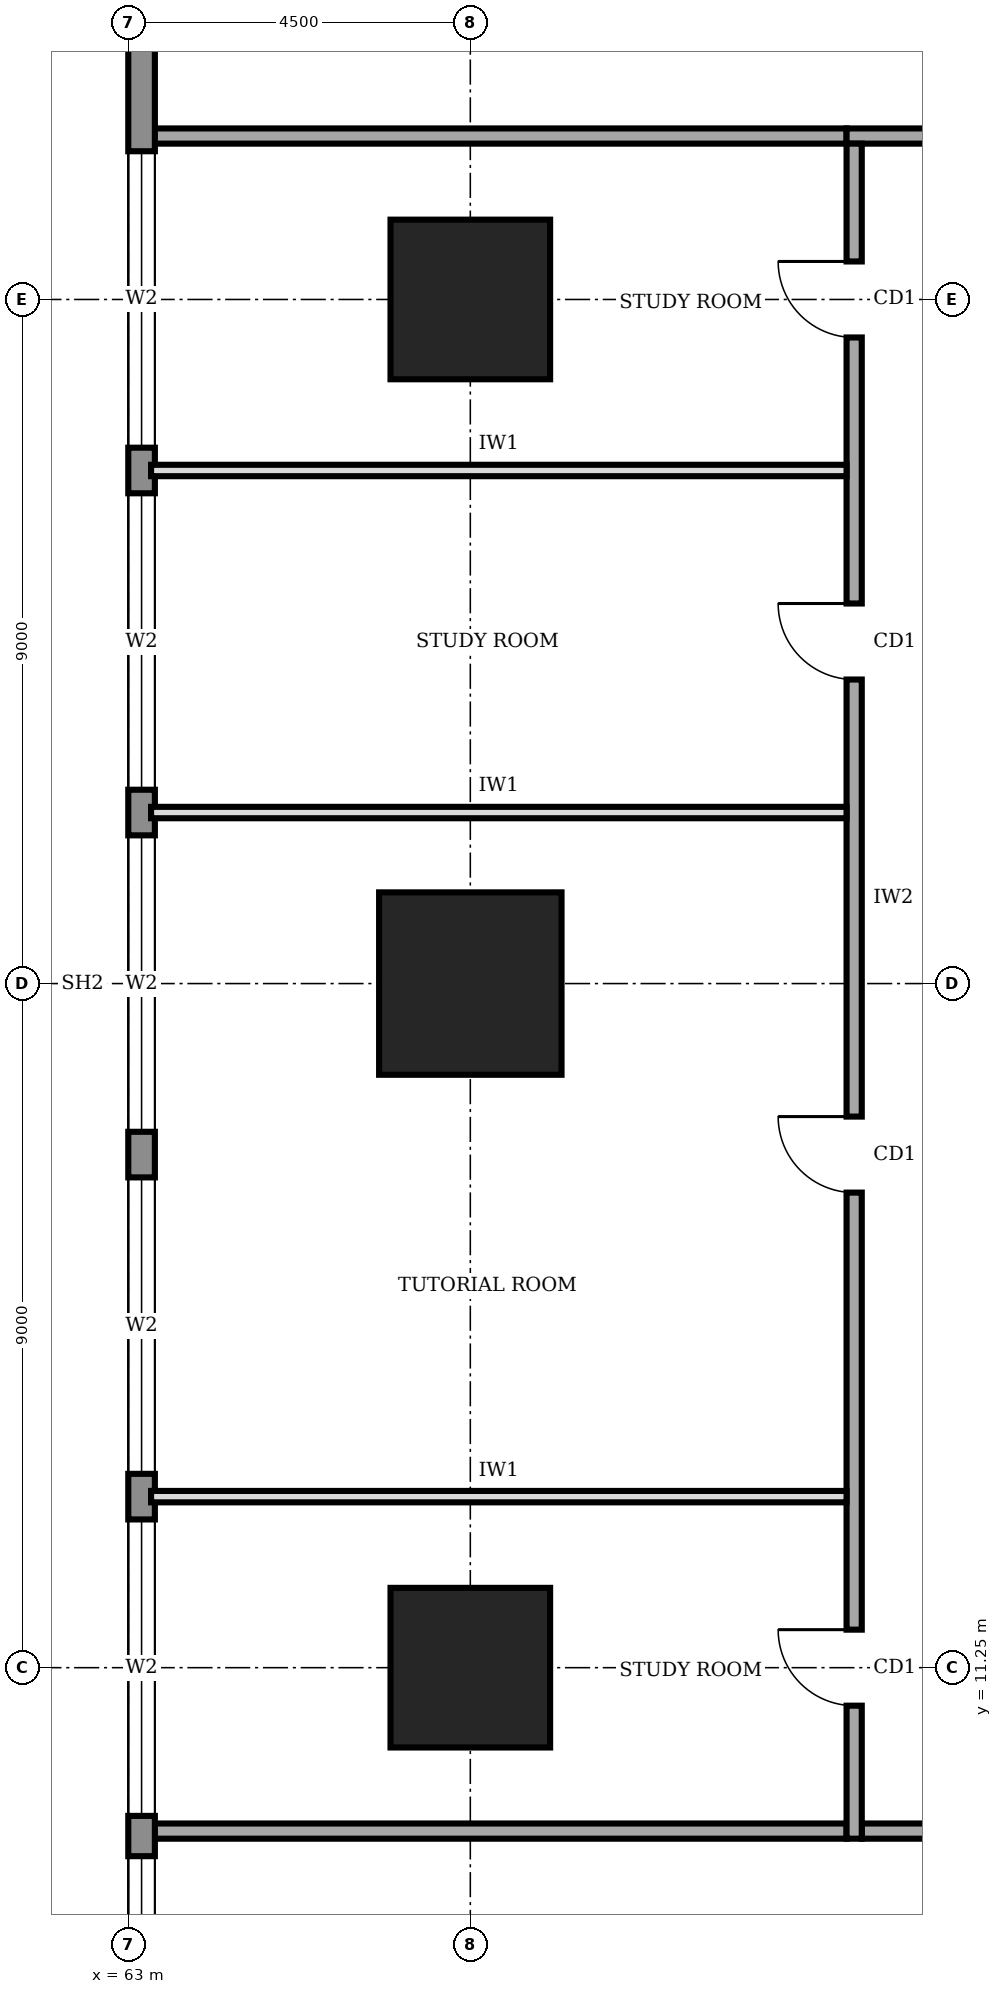
"""IFC4 building model, lengths in metres.
Left out: names, types, materials, properties, quantities, classifications, styles, units other than length and angle.
Written with IfcOpenShell. Run it as: python <this file> out.ifc"""

import sys

from ifc_helpers import new_model, si_unit, direction, frame, frame_2d, origin, origin_2d, place, context, subcontext, project, spatial, rectangle, extrude, element, fill, save


model = new_model("IFC4")
c1 = context("Model", 3, precision=1e-05, world=origin(), true_north=direction((0.0, 1.0)))
c2 = subcontext(c1, "Body", "Model", "MODEL_VIEW")
j1 = project(units=[si_unit("LENGTHUNIT", "METRE"), si_unit("PLANEANGLEUNIT", "RADIAN")], contexts=[c1])
p1 = place(None, origin())
s1 = spatial("IfcSite", under=j1, at=p1, CompositionType="ELEMENT")
p2 = place(p1, origin())
s2 = spatial("IfcBuilding", under=s1, at=p2, CompositionType="ELEMENT")
p3 = place(p2, frame((0.0, 0.0, 73.0)))
s3 = spatial("IfcBuildingStorey", under=s2, at=p3, CompositionType="ELEMENT", Elevation=73.0)
p4 = place(p3, frame((67.5, 11.25, 0.0), z_axis=(0.0, 0.0, 1.0), x_axis=(1.0, 0.0, 0.0)))
e1 = element("IfcColumn", 1, at=p4, inside=s3, PredefinedType="COLUMN", context=c2, shape_type="SweptSolid", body=[
    extrude(rectangle(XDim=2.1, YDim=2.1, at=origin_2d()), origin(), (0.0, 0.0, 1.0), 4.0),
])
p5 = place(p3, frame((67.5, 20.25, 0.0), z_axis=(0.0, 0.0, 1.0), x_axis=(1.0, 0.0, 0.0)))
e2 = element("IfcColumn", 2, at=p5, inside=s3, PredefinedType="COLUMN", context=c2, shape_type="SweptSolid", body=[
    extrude(rectangle(XDim=2.4, YDim=2.4, at=origin_2d()), origin(), (0.0, 0.0, 1.0), 4.0),
])
p6 = place(p3, frame((67.5, 29.25, 0.0), z_axis=(0.0, 0.0, 1.0), x_axis=(1.0, 0.0, 0.0)))
e3 = element("IfcColumn", 3, at=p6, inside=s3, PredefinedType="COLUMN", context=c2, shape_type="SweptSolid", body=[
    extrude(rectangle(XDim=2.1, YDim=2.1, at=origin_2d()), origin(), (0.0, 0.0, 1.0), 4.0),
])
p7 = place(p3, frame((63.175, 35.98, 0.0), z_axis=(0.0, 0.0, 1.0), x_axis=(0.0, -1.0, 0.0)))
e4 = element("IfcWall", 4, at=p7, inside=s3, PredefinedType="STANDARD", context=c2, shape_type="SweptSolid", body=[
    extrude(rectangle(XDim=31.46, YDim=0.35, at=frame_2d((15.73, 0.0))), origin(), (0.0, 0.0, 1.0), 3.75),
])
p8 = place(p7, frame((27.21, 0.0, 0.6)))
e5 = element("IfcOpeningElement", 5, at=p8, cuts=e4, PredefinedType="OPENING", context=c2, shape_type="SweptSolid", body=[
    extrude(rectangle(XDim=3.9, YDim=2.6, at=frame_2d((1.95, 1.3))), frame((0.0, 0.185, 0.0), z_axis=(0.0, -1.0, 0.0), x_axis=(1.0, 0.0, 0.0)), (0.0, 0.0, 1.0), 0.37),
])
p9 = place(p7, frame((22.78, 0.0, 0.6)))
e6 = element("IfcOpeningElement", 6, at=p9, cuts=e4, PredefinedType="OPENING", context=c2, shape_type="SweptSolid", body=[
    extrude(rectangle(XDim=3.9, YDim=2.6, at=frame_2d((1.95, 1.3))), frame((0.0, 0.185, 0.0), z_axis=(0.0, -1.0, 0.0), x_axis=(1.0, 0.0, 0.0)), (0.0, 0.0, 1.0), 0.37),
])
p10 = place(p7, frame((18.28, 0.0, 0.6)))
e7 = element("IfcOpeningElement", 7, at=p10, cuts=e4, PredefinedType="OPENING", context=c2, shape_type="SweptSolid", body=[
    extrude(rectangle(XDim=3.9, YDim=2.6, at=frame_2d((1.95, 1.3))), frame((0.0, 0.185, 0.0), z_axis=(0.0, -1.0, 0.0), x_axis=(1.0, 0.0, 0.0)), (0.0, 0.0, 1.0), 0.37),
])
p11 = place(p7, frame((13.78, 0.0, 0.6)))
e8 = element("IfcOpeningElement", 8, at=p11, cuts=e4, PredefinedType="OPENING", context=c2, shape_type="SweptSolid", body=[
    extrude(rectangle(XDim=3.9, YDim=2.6, at=frame_2d((1.95, 1.3))), frame((0.0, 0.185, 0.0), z_axis=(0.0, -1.0, 0.0), x_axis=(1.0, 0.0, 0.0)), (0.0, 0.0, 1.0), 0.37),
])
p12 = place(p7, frame((9.28, 0.0, 0.6)))
e9 = element("IfcOpeningElement", 9, at=p12, cuts=e4, PredefinedType="OPENING", context=c2, shape_type="SweptSolid", body=[
    extrude(rectangle(XDim=3.9, YDim=2.6, at=frame_2d((1.95, 1.3))), frame((0.0, 0.185, 0.0), z_axis=(0.0, -1.0, 0.0), x_axis=(1.0, 0.0, 0.0)), (0.0, 0.0, 1.0), 0.37),
])
p13 = place(p7, frame((4.78, 0.0, 0.6)))
e10 = element("IfcOpeningElement", 10, at=p13, cuts=e4, PredefinedType="OPENING", context=c2, shape_type="SweptSolid", body=[
    extrude(rectangle(XDim=3.9, YDim=2.6, at=frame_2d((1.95, 1.3))), frame((0.0, 0.185, 0.0), z_axis=(0.0, -1.0, 0.0), x_axis=(1.0, 0.0, 0.0)), (0.0, 0.0, 1.0), 0.37),
])
p14 = place(p3, frame((72.65, 9.1, 0.0), z_axis=(0.0, 0.0, 1.0), x_axis=(1.0, 0.0, 0.0)))
e11 = element("IfcWall", 11, at=p14, inside=s3, PredefinedType="SOLIDWALL", context=c2, shape_type="SweptSolid", body=[
    extrude(rectangle(XDim=16.9, YDim=0.2, at=frame_2d((8.45, 0.0))), origin(), (0.0, 0.0, 1.0), 3.75),
])
p15 = place(p14, frame((0.925, 0.0, 0.0)))
e12 = element("IfcOpeningElement", 12, at=p15, cuts=e11, PredefinedType="OPENING", context=c2, shape_type="SweptSolid", body=[
    extrude(rectangle(XDim=1.8, YDim=2.1, at=frame_2d((0.9, 1.05))), frame((0.0, 0.11, 0.0), z_axis=(0.0, -1.0, 0.0), x_axis=(1.0, 0.0, 0.0)), (0.0, 0.0, 1.0), 0.22),
])
p16 = place(p14, frame((7.85, 0.0, 0.0)))
e13 = element("IfcOpeningElement", 13, at=p16, cuts=e11, PredefinedType="OPENING", context=c2, shape_type="SweptSolid", body=[
    extrude(rectangle(XDim=1.0, YDim=2.1, at=frame_2d((0.5, 1.05))), frame((0.0, 0.11, 0.0), z_axis=(0.0, -1.0, 0.0), x_axis=(1.0, 0.0, 0.0)), (0.0, 0.0, 1.0), 0.22),
])
p17 = place(p14, frame((13.975, 0.0, 0.0)))
e14 = element("IfcOpeningElement", 14, at=p17, cuts=e11, PredefinedType="OPENING", context=c2, shape_type="SweptSolid", body=[
    extrude(rectangle(XDim=1.8, YDim=2.1, at=frame_2d((0.9, 1.05))), frame((0.0, 0.11, 0.0), z_axis=(0.0, -1.0, 0.0), x_axis=(1.0, 0.0, 0.0)), (0.0, 0.0, 1.0), 0.22),
])
p18 = place(p3, frame((89.35, 31.4, 0.0), z_axis=(0.0, 0.0, 1.0), x_axis=(-1.0, 0.0, 0.0)))
e15 = element("IfcWall", 15, at=p18, inside=s3, PredefinedType="SOLIDWALL", context=c2, shape_type="SweptSolid", body=[
    extrude(rectangle(XDim=16.9, YDim=0.2, at=frame_2d((8.45, 0.0))), origin(), (0.0, 0.0, 1.0), 3.75),
])
p19 = place(p18, frame((13.975, 0.0, 0.0)))
e16 = element("IfcOpeningElement", 16, at=p19, cuts=e15, PredefinedType="OPENING", context=c2, shape_type="SweptSolid", body=[
    extrude(rectangle(XDim=1.8, YDim=2.1, at=frame_2d((0.9, 1.05))), frame((0.0, 0.11, 0.0), z_axis=(0.0, -1.0, 0.0), x_axis=(1.0, 0.0, 0.0)), (0.0, 0.0, 1.0), 0.22),
])
p20 = place(p18, frame((7.85, 0.0, 0.0)))
e17 = element("IfcOpeningElement", 17, at=p20, cuts=e15, PredefinedType="OPENING", context=c2, shape_type="SweptSolid", body=[
    extrude(rectangle(XDim=1.0, YDim=2.1, at=frame_2d((0.5, 1.05))), frame((0.0, 0.11, 0.0), z_axis=(0.0, -1.0, 0.0), x_axis=(1.0, 0.0, 0.0)), (0.0, 0.0, 1.0), 0.22),
])
p21 = place(p18, frame((0.925, 0.0, 0.0)))
e18 = element("IfcOpeningElement", 18, at=p21, cuts=e15, PredefinedType="OPENING", context=c2, shape_type="SweptSolid", body=[
    extrude(rectangle(XDim=1.8, YDim=2.1, at=frame_2d((0.9, 1.05))), frame((0.0, 0.11, 0.0), z_axis=(0.0, -1.0, 0.0), x_axis=(1.0, 0.0, 0.0)), (0.0, 0.0, 1.0), 0.22),
])
p22 = place(p3, frame((72.55, 31.3, 0.0), z_axis=(0.0, 0.0, 1.0), x_axis=(0.0, -1.0, 0.0)))
e19 = element("IfcWall", 19, at=p22, inside=s3, PredefinedType="SOLIDWALL", context=c2, shape_type="SweptSolid", body=[
    extrude(rectangle(XDim=22.3, YDim=0.2, at=frame_2d((11.15, 0.0))), origin(), (0.0, 0.0, 1.0), 3.75),
])
p23 = place(p22, frame((19.55, 0.0, 0.0)))
e20 = element("IfcOpeningElement", 20, at=p23, cuts=e19, PredefinedType="OPENING", context=c2, shape_type="SweptSolid", body=[
    extrude(rectangle(XDim=1.0, YDim=2.1, at=frame_2d((0.5, 1.05))), frame((0.0, 0.11, 0.0), z_axis=(0.0, -1.0, 0.0), x_axis=(1.0, 0.0, 0.0)), (0.0, 0.0, 1.0), 0.22),
])
p24 = place(p22, frame((12.8, 0.0, 0.0)))
e21 = element("IfcOpeningElement", 21, at=p24, cuts=e19, PredefinedType="OPENING", context=c2, shape_type="SweptSolid", body=[
    extrude(rectangle(XDim=1.0, YDim=2.1, at=frame_2d((0.5, 1.05))), frame((0.0, 0.11, 0.0), z_axis=(0.0, -1.0, 0.0), x_axis=(1.0, 0.0, 0.0)), (0.0, 0.0, 1.0), 0.22),
])
p25 = place(p22, frame((6.05, 0.0, 0.0)))
e22 = element("IfcOpeningElement", 22, at=p25, cuts=e19, PredefinedType="OPENING", context=c2, shape_type="SweptSolid", body=[
    extrude(rectangle(XDim=1.0, YDim=2.1, at=frame_2d((0.5, 1.05))), frame((0.0, 0.11, 0.0), z_axis=(0.0, -1.0, 0.0), x_axis=(1.0, 0.0, 0.0)), (0.0, 0.0, 1.0), 0.22),
])
p26 = place(p22, frame((1.55, 0.0, 0.0)))
e23 = element("IfcOpeningElement", 23, at=p26, cuts=e19, PredefinedType="OPENING", context=c2, shape_type="SweptSolid", body=[
    extrude(rectangle(XDim=1.0, YDim=2.1, at=frame_2d((0.5, 1.05))), frame((0.0, 0.11, 0.0), z_axis=(0.0, -1.0, 0.0), x_axis=(1.0, 0.0, 0.0)), (0.0, 0.0, 1.0), 0.22),
])
for number, where, z_axis, x_axis in (
    (24, (63.3, 9.1, 0.0), (0.0, 0.0, 1.0), (1.0, 0.0, 0.0)),
    (25, (63.3, 31.4, 0.0), (0.0, 0.0, 1.0), (1.0, 0.0, 0.0)),
):
    element("IfcWall", number, at=place(p3, frame(where, z_axis=z_axis, x_axis=x_axis)), inside=s3, PredefinedType="SOLIDWALL", context=c2, shape_type="SweptSolid", body=[
        extrude(rectangle(XDim=9.15, YDim=0.2, at=frame_2d((4.575, 0.0))), origin(), (0.0, 0.0, 1.0), 3.75),
    ])
for number, where, z_axis, x_axis in (
    (26, (63.3, 13.5, 0.0), (0.0, 0.0, 1.0), (1.0, 0.0, 0.0)),
    (27, (63.3, 22.5, 0.0), (0.0, 0.0, 1.0), (1.0, 0.0, 0.0)),
    (28, (63.3, 27.0, 0.0), (0.0, 0.0, 1.0), (1.0, 0.0, 0.0)),
):
    element("IfcWall", number, at=place(p3, frame(where, z_axis=z_axis, x_axis=x_axis)), inside=s3, PredefinedType="PARTITIONING", context=c2, shape_type="SweptSolid", body=[
        extrude(rectangle(XDim=9.15, YDim=0.15, at=frame_2d((4.575, 0.0))), origin(), (0.0, 0.0, 1.0), 3.75),
    ])
p27 = place(p8, origin())
e29 = element("IfcWindow", 29, at=p27, inside=s3, PartitioningType="SINGLE_PANEL", PredefinedType="WINDOW", context=c2, shape_type="SweptSolid", body=[
    extrude(rectangle(XDim=3.9, YDim=2.6, at=frame_2d((1.95, 1.3))), frame((0.0, 0.03, 0.0), z_axis=(0.0, -1.0, 0.0), x_axis=(1.0, 0.0, 0.0)), (0.0, 0.0, 1.0), 0.06),
])
fill(e5, e29)
p28 = place(p9, origin())
e30 = element("IfcWindow", 30, at=p28, inside=s3, PartitioningType="SINGLE_PANEL", PredefinedType="WINDOW", context=c2, shape_type="SweptSolid", body=[
    extrude(rectangle(XDim=3.9, YDim=2.6, at=frame_2d((1.95, 1.3))), frame((0.0, 0.03, 0.0), z_axis=(0.0, -1.0, 0.0), x_axis=(1.0, 0.0, 0.0)), (0.0, 0.0, 1.0), 0.06),
])
fill(e6, e30)
p29 = place(p10, origin())
e31 = element("IfcWindow", 31, at=p29, inside=s3, PartitioningType="SINGLE_PANEL", PredefinedType="WINDOW", context=c2, shape_type="SweptSolid", body=[
    extrude(rectangle(XDim=3.9, YDim=2.6, at=frame_2d((1.95, 1.3))), frame((0.0, 0.03, 0.0), z_axis=(0.0, -1.0, 0.0), x_axis=(1.0, 0.0, 0.0)), (0.0, 0.0, 1.0), 0.06),
])
fill(e7, e31)
p30 = place(p11, origin())
e32 = element("IfcWindow", 32, at=p30, inside=s3, PartitioningType="SINGLE_PANEL", PredefinedType="WINDOW", context=c2, shape_type="SweptSolid", body=[
    extrude(rectangle(XDim=3.9, YDim=2.6, at=frame_2d((1.95, 1.3))), frame((0.0, 0.03, 0.0), z_axis=(0.0, -1.0, 0.0), x_axis=(1.0, 0.0, 0.0)), (0.0, 0.0, 1.0), 0.06),
])
fill(e8, e32)
p31 = place(p12, origin())
e33 = element("IfcWindow", 33, at=p31, inside=s3, PartitioningType="SINGLE_PANEL", PredefinedType="WINDOW", context=c2, shape_type="SweptSolid", body=[
    extrude(rectangle(XDim=3.9, YDim=2.6, at=frame_2d((1.95, 1.3))), frame((0.0, 0.03, 0.0), z_axis=(0.0, -1.0, 0.0), x_axis=(1.0, 0.0, 0.0)), (0.0, 0.0, 1.0), 0.06),
])
fill(e9, e33)
p32 = place(p13, origin())
e34 = element("IfcWindow", 34, at=p32, inside=s3, PartitioningType="SINGLE_PANEL", PredefinedType="WINDOW", context=c2, shape_type="SweptSolid", body=[
    extrude(rectangle(XDim=3.9, YDim=2.6, at=frame_2d((1.95, 1.3))), frame((0.0, 0.03, 0.0), z_axis=(0.0, -1.0, 0.0), x_axis=(1.0, 0.0, 0.0)), (0.0, 0.0, 1.0), 0.06),
])
fill(e10, e34)
p33 = place(p23, frame((1.0, 0.0, 0.0), z_axis=(0.0, 0.0, 1.0), x_axis=(-1.0, 0.0, 0.0)))
e35 = element("IfcDoor", 35, at=p33, inside=s3, OperationType="SINGLE_SWING_RIGHT", PredefinedType="DOOR", context=c2, shape_type="SweptSolid", body=[
    extrude(rectangle(XDim=1.0, YDim=2.1, at=frame_2d((0.5, 1.05))), frame((0.0, 0.025, 0.0), z_axis=(0.0, -1.0, 0.0), x_axis=(1.0, 0.0, 0.0)), (0.0, 0.0, 1.0), 0.05),
])
fill(e20, e35)
p34 = place(p24, frame((1.0, 0.0, 0.0), z_axis=(0.0, 0.0, 1.0), x_axis=(-1.0, 0.0, 0.0)))
e36 = element("IfcDoor", 36, at=p34, inside=s3, OperationType="SINGLE_SWING_RIGHT", PredefinedType="DOOR", context=c2, shape_type="SweptSolid", body=[
    extrude(rectangle(XDim=1.0, YDim=2.1, at=frame_2d((0.5, 1.05))), frame((0.0, 0.025, 0.0), z_axis=(0.0, -1.0, 0.0), x_axis=(1.0, 0.0, 0.0)), (0.0, 0.0, 1.0), 0.05),
])
fill(e21, e36)
p35 = place(p25, frame((1.0, 0.0, 0.0), z_axis=(0.0, 0.0, 1.0), x_axis=(-1.0, 0.0, 0.0)))
e37 = element("IfcDoor", 37, at=p35, inside=s3, OperationType="SINGLE_SWING_RIGHT", PredefinedType="DOOR", context=c2, shape_type="SweptSolid", body=[
    extrude(rectangle(XDim=1.0, YDim=2.1, at=frame_2d((0.5, 1.05))), frame((0.0, 0.025, 0.0), z_axis=(0.0, -1.0, 0.0), x_axis=(1.0, 0.0, 0.0)), (0.0, 0.0, 1.0), 0.05),
])
fill(e22, e37)
p36 = place(p26, frame((1.0, 0.0, 0.0), z_axis=(0.0, 0.0, 1.0), x_axis=(-1.0, 0.0, 0.0)))
e38 = element("IfcDoor", 38, at=p36, inside=s3, OperationType="SINGLE_SWING_RIGHT", PredefinedType="DOOR", context=c2, shape_type="SweptSolid", body=[
    extrude(rectangle(XDim=1.0, YDim=2.1, at=frame_2d((0.5, 1.05))), frame((0.0, 0.025, 0.0), z_axis=(0.0, -1.0, 0.0), x_axis=(1.0, 0.0, 0.0)), (0.0, 0.0, 1.0), 0.05),
])
fill(e23, e38)
save(model, sys.argv[1])
